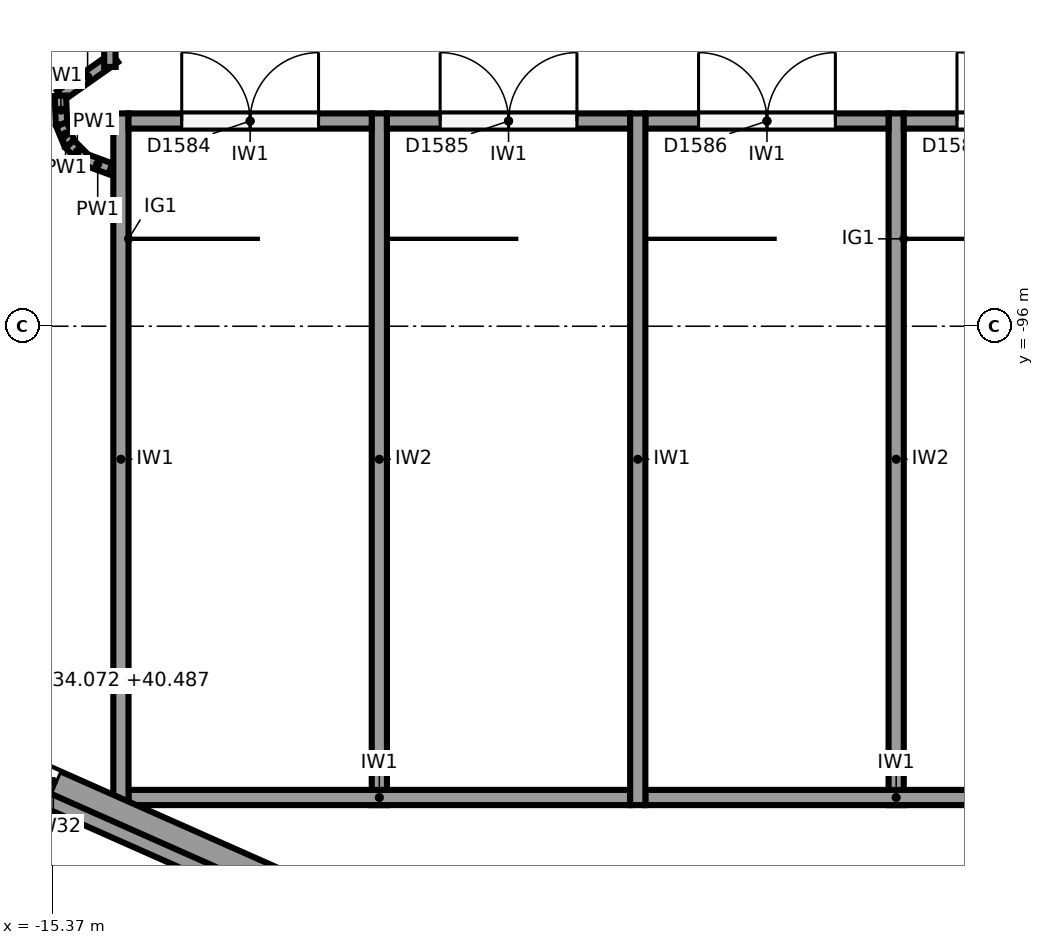
"""IFC4 building model, lengths in metres.
Left out: names, types, materials, properties, quantities, classifications, styles, units other than length and angle.
Written with IfcOpenShell. Run it as: python <this file> out.ifc"""

import sys

from ifc_helpers import new_model, si_unit, direction, frame, frame_2d, origin, place, context, subcontext, project, spatial, polyline, rectangle, outline, extrude, element, fill, save


model = new_model("IFC4")
c1 = context("Model", 3, precision=1e-05, world=origin(), true_north=direction((0.0, 1.0)))
c2 = subcontext(c1, "Body", "Model", "MODEL_VIEW")
j1 = project(units=[si_unit("LENGTHUNIT", "METRE"), si_unit("PLANEANGLEUNIT", "RADIAN")], contexts=[c1])
p1 = place(None, origin())
s1 = spatial("IfcSite", under=j1, at=p1, CompositionType="ELEMENT")
p2 = place(p1, origin())
s2 = spatial("IfcBuilding", under=s1, at=p2, CompositionType="ELEMENT")
p3 = place(p2, frame((0.0, 0.0, 24.0)))
s3 = spatial("IfcBuildingStorey", under=s2, at=p3, CompositionType="ELEMENT", Elevation=24.0)
p4 = place(p3, frame((-8.123, -105.198, 0.0), z_axis=(0.0, 0.0, 1.0), x_axis=(-0.914138897099, 0.405401130748, 0.0)))
e1 = element("IfcWall", 1, at=p4, inside=s3, PredefinedType="SOLIDWALL", context=c2, shape_type="SweptSolid", body=[
    extrude(rectangle(XDim=15.824, YDim=0.32, at=frame_2d((7.912, 0.0))), origin(), (0.0, 0.0, 1.0), 6.0),
])
p5 = place(p4, frame((14.174, 0.0, 1.0)))
e2 = element("IfcOpeningElement", 2, at=p5, cuts=e1, PredefinedType="OPENING", context=c2, shape_type="SweptSolid", body=[
    extrude(rectangle(XDim=0.9, YDim=3.25, at=frame_2d((0.45, 1.625))), frame((0.0, 0.17, 0.0), z_axis=(0.0, -1.0, 0.0), x_axis=(1.0, 0.0, 0.0)), (0.0, 0.0, 1.0), 0.34),
])
p6 = place(p4, frame((12.074, 0.0, 1.0)))
e3 = element("IfcOpeningElement", 3, at=p6, cuts=e1, PredefinedType="OPENING", context=c2, shape_type="SweptSolid", body=[
    extrude(rectangle(XDim=0.9, YDim=3.25, at=frame_2d((0.45, 1.625))), frame((0.0, 0.17, 0.0), z_axis=(0.0, -1.0, 0.0), x_axis=(1.0, 0.0, 0.0)), (0.0, 0.0, 1.0), 0.34),
])
p7 = place(p4, frame((9.974, 0.0, 1.0)))
e4 = element("IfcOpeningElement", 4, at=p7, cuts=e1, PredefinedType="OPENING", context=c2, shape_type="SweptSolid", body=[
    extrude(rectangle(XDim=0.9, YDim=3.25, at=frame_2d((0.45, 1.625))), frame((0.0, 0.17, 0.0), z_axis=(0.0, -1.0, 0.0), x_axis=(1.0, 0.0, 0.0)), (0.0, 0.0, 1.0), 0.34),
])
p8 = place(p4, frame((7.874, 0.0, 1.0)))
e5 = element("IfcOpeningElement", 5, at=p8, cuts=e1, PredefinedType="OPENING", context=c2, shape_type="SweptSolid", body=[
    extrude(rectangle(XDim=0.9, YDim=3.25, at=frame_2d((0.45, 1.625))), frame((0.0, 0.17, 0.0), z_axis=(0.0, -1.0, 0.0), x_axis=(1.0, 0.0, 0.0)), (0.0, 0.0, 1.0), 0.34),
])
p9 = place(p3, frame((-8.204, -105.38, 6.0), z_axis=(0.0, 0.0, 1.0), x_axis=(-0.914138897099, 0.405401130748, 0.0)))
e6 = element("IfcWall", 6, at=p9, inside=s3, PredefinedType="SOLIDWALL", context=c2, shape_type="SweptSolid", body=[
    extrude(outline(polyline([(0.0, 0.0), (15.824, 0.0), (15.824, 4.072), (0.0, 10.488), (0.0, 0.0)])), frame((0.0, 0.16, 0.0), z_axis=(0.0, -1.0, 0.0), x_axis=(1.0, 0.0, 0.0)), (0.0, 0.0, 1.0), 0.32),
])
p10 = place(p9, frame((9.974, 0.0, 1.6)))
e7 = element("IfcOpeningElement", 7, at=p10, cuts=e6, PredefinedType="OPENING", context=c2, shape_type="SweptSolid", body=[
    extrude(rectangle(XDim=0.9, YDim=3.0, at=frame_2d((0.45, 1.5))), frame((0.0, 0.17, 0.0), z_axis=(0.0, -1.0, 0.0), x_axis=(1.0, 0.0, 0.0)), (0.0, 0.0, 1.0), 0.34),
])
p11 = place(p9, frame((7.874, 0.0, 1.6)))
e8 = element("IfcOpeningElement", 8, at=p11, cuts=e6, PredefinedType="OPENING", context=c2, shape_type="SweptSolid", body=[
    extrude(rectangle(XDim=0.9, YDim=3.0, at=frame_2d((0.45, 1.5))), frame((0.0, 0.17, 0.0), z_axis=(0.0, -1.0, 0.0), x_axis=(1.0, 0.0, 0.0)), (0.0, 0.0, 1.0), 0.34),
])
p12 = place(p3, frame((1.852, -101.397, 0.0), z_axis=(0.0, 0.0, 1.0), x_axis=(-0.914133039962, -0.405414337745, 0.0)))
e9 = element("IfcWall", 9, at=p12, inside=s3, PredefinedType="SOLIDWALL", context=c2, shape_type="SweptSolid", body=[
    extrude(rectangle(XDim=9.824, YDim=0.32, at=frame_2d((4.912, 0.0))), origin(), (0.0, 0.0, 1.0), 6.0),
])
p13 = place(p12, frame((1.05, 0.0, 1.0)))
e10 = element("IfcOpeningElement", 10, at=p13, cuts=e9, PredefinedType="OPENING", context=c2, shape_type="SweptSolid", body=[
    extrude(rectangle(XDim=0.9, YDim=3.25, at=frame_2d((0.45, 1.625))), frame((0.0, 0.17, 0.0), z_axis=(0.0, -1.0, 0.0), x_axis=(1.0, 0.0, 0.0)), (0.0, 0.0, 1.0), 0.34),
])
p14 = place(p3, frame((1.852, -101.397, 6.0), z_axis=(0.0, 0.0, 1.0), x_axis=(-0.914133039962, -0.405414337745, 0.0)))
e11 = element("IfcWall", 11, at=p14, inside=s3, PredefinedType="SOLIDWALL", context=c2, shape_type="SweptSolid", body=[
    extrude(outline(polyline([(0.0, 0.0), (9.824, 0.0), (9.824, 10.488), (0.0, 6.505), (0.0, 0.0)])), frame((0.0, 0.16, 0.0), z_axis=(0.0, -1.0, 0.0), x_axis=(1.0, 0.0, 0.0)), (0.0, 0.0, 1.0), 0.32),
])
p15 = place(p14, frame((1.05, 0.0, 1.6)))
e12 = element("IfcOpeningElement", 12, at=p15, cuts=e11, PredefinedType="OPENING", context=c2, shape_type="SweptSolid", body=[
    extrude(rectangle(XDim=0.9, YDim=3.0, at=frame_2d((0.45, 1.5))), frame((0.0, 0.17, 0.0), z_axis=(0.0, -1.0, 0.0), x_axis=(1.0, 0.0, 0.0)), (0.0, 0.0, 1.0), 0.34),
])
for number, where, z_axis, x_axis in (
    (13, (-14.467, -102.3, 0.0), (0.0, 0.0, 1.0), (0.0, 1.0, 0.0)),
    (14, (-7.667, -102.3, 0.0), (0.0, 0.0, 1.0), (0.0, 1.0, 0.0)),
):
    element("IfcWall", number, at=place(p3, frame(where, z_axis=z_axis, x_axis=x_axis)), inside=s3, PredefinedType="SHEAR", context=c2, shape_type="SweptSolid", body=[
        extrude(rectangle(XDim=9.1, YDim=0.2, at=frame_2d((4.55, 0.0))), origin(), (0.0, 0.0, 1.0), 5.75),
    ])
p16 = place(p3, frame((-14.367, -102.2, 0.0), z_axis=(0.0, 0.0, 1.0), x_axis=(1.0, 0.0, 0.0)))
e15 = element("IfcWall", 15, at=p16, inside=s3, PredefinedType="SHEAR", context=c2, shape_type="SweptSolid", body=[
    extrude(rectangle(XDim=6.6, YDim=0.2, at=frame_2d((3.3, 0.0))), origin(), (0.0, 0.0, 1.0), 5.75),
])
p17 = place(p3, frame((-7.567, -102.2, 0.0), z_axis=(0.0, 0.0, 1.0), x_axis=(1.0, 0.0, 0.0)))
e16 = element("IfcWall", 16, at=p17, inside=s3, PredefinedType="SHEAR", context=c2, shape_type="SweptSolid", body=[
    extrude(rectangle(XDim=6.6, YDim=0.2, at=frame_2d((3.3, 0.0))), origin(), (0.0, 0.0, 1.0), 5.75),
])
for number, where, z_axis, x_axis in (
    (17, (-11.067, -102.3, 0.0), (0.0, 0.0, 1.0), (0.0, 1.0, 0.0)),
    (18, (-4.267, -102.3, 0.0), (0.0, 0.0, 1.0), (0.0, 1.0, 0.0)),
):
    element("IfcWall", number, at=place(p3, frame(where, z_axis=z_axis, x_axis=x_axis)), inside=s3, PredefinedType="SHEAR", context=c2, shape_type="SweptSolid", body=[
        extrude(rectangle(XDim=9.1, YDim=0.2, at=frame_2d((4.55, 0.0))), origin(), (0.0, 0.0, 1.0), 5.75),
    ])
p18 = place(p3, frame((-14.367, -93.3, 0.0), z_axis=(0.0, 0.0, 1.0), x_axis=(1.0, 0.0, 0.0)))
e19 = element("IfcWall", 19, at=p18, inside=s3, PredefinedType="SHEAR", context=c2, shape_type="SweptSolid", body=[
    extrude(rectangle(XDim=3.2, YDim=0.2, at=frame_2d((1.6, 0.0))), origin(), (0.0, 0.0, 1.0), 5.75),
])
p19 = place(p18, frame((0.7, 0.0, 0.0)))
e20 = element("IfcOpeningElement", 20, at=p19, cuts=e19, PredefinedType="OPENING", context=c2, shape_type="SweptSolid", body=[
    extrude(rectangle(XDim=1.8, YDim=2.1, at=frame_2d((0.9, 1.05))), frame((0.0, 0.11, 0.0), z_axis=(0.0, -1.0, 0.0), x_axis=(1.0, 0.0, 0.0)), (0.0, 0.0, 1.0), 0.22),
])
p20 = place(p3, frame((-10.967, -93.3, 0.0), z_axis=(0.0, 0.0, 1.0), x_axis=(1.0, 0.0, 0.0)))
e21 = element("IfcWall", 21, at=p20, inside=s3, PredefinedType="SHEAR", context=c2, shape_type="SweptSolid", body=[
    extrude(rectangle(XDim=3.2, YDim=0.2, at=frame_2d((1.6, 0.0))), origin(), (0.0, 0.0, 1.0), 5.75),
])
p21 = place(p20, frame((0.7, 0.0, 0.0)))
e22 = element("IfcOpeningElement", 22, at=p21, cuts=e21, PredefinedType="OPENING", context=c2, shape_type="SweptSolid", body=[
    extrude(rectangle(XDim=1.8, YDim=2.1, at=frame_2d((0.9, 1.05))), frame((0.0, 0.11, 0.0), z_axis=(0.0, -1.0, 0.0), x_axis=(1.0, 0.0, 0.0)), (0.0, 0.0, 1.0), 0.22),
])
p22 = place(p3, frame((-7.567, -93.3, 0.0), z_axis=(0.0, 0.0, 1.0), x_axis=(1.0, 0.0, 0.0)))
e23 = element("IfcWall", 23, at=p22, inside=s3, PredefinedType="SHEAR", context=c2, shape_type="SweptSolid", body=[
    extrude(rectangle(XDim=3.2, YDim=0.2, at=frame_2d((1.6, 0.0))), origin(), (0.0, 0.0, 1.0), 5.75),
])
p23 = place(p22, frame((0.7, 0.0, 0.0)))
e24 = element("IfcOpeningElement", 24, at=p23, cuts=e23, PredefinedType="OPENING", context=c2, shape_type="SweptSolid", body=[
    extrude(rectangle(XDim=1.8, YDim=2.1, at=frame_2d((0.9, 1.05))), frame((0.0, 0.11, 0.0), z_axis=(0.0, -1.0, 0.0), x_axis=(1.0, 0.0, 0.0)), (0.0, 0.0, 1.0), 0.22),
])
p24 = place(p3, frame((-4.167, -93.3, 0.0), z_axis=(0.0, 0.0, 1.0), x_axis=(1.0, 0.0, 0.0)))
e25 = element("IfcWall", 25, at=p24, inside=s3, PredefinedType="SHEAR", context=c2, shape_type="SweptSolid", body=[
    extrude(rectangle(XDim=3.2, YDim=0.2, at=frame_2d((1.6, 0.0))), origin(), (0.0, 0.0, 1.0), 5.75),
])
p25 = place(p24, frame((0.7, 0.0, 0.0)))
e26 = element("IfcOpeningElement", 26, at=p25, cuts=e25, PredefinedType="OPENING", context=c2, shape_type="SweptSolid", body=[
    extrude(rectangle(XDim=1.8, YDim=2.1, at=frame_2d((0.9, 1.05))), frame((0.0, 0.11, 0.0), z_axis=(0.0, -1.0, 0.0), x_axis=(1.0, 0.0, 0.0)), (0.0, 0.0, 1.0), 0.22),
])
p26 = place(p3, frame((-14.547, -92.464, 0.0), z_axis=(0.0, 0.0, 1.0), x_axis=(-0.817670329912, -0.57568674779, 0.0)))
e27 = element("IfcWall", 27, at=p26, inside=s3, PredefinedType="PARTITIONING", context=c2, shape_type="SweptSolid", body=[
    extrude(rectangle(XDim=0.876, YDim=0.15, at=frame_2d((0.438, 0.0))), origin(), (0.0, 0.0, 1.0), 5.4),
])
p27 = place(p3, frame((-15.263, -92.968, 0.0), z_axis=(0.0, 0.0, 1.0), x_axis=(0.039007374993, -0.999238922729, 0.0)))
e28 = element("IfcWall", 28, at=p27, inside=s3, PredefinedType="PARTITIONING", context=c2, shape_type="SweptSolid", body=[
    extrude(rectangle(XDim=0.375, YDim=0.15, at=frame_2d((0.188, 0.0))), origin(), (0.0, 0.0, 1.0), 5.4),
])
p28 = place(p3, frame((-15.249, -93.343, 0.0), z_axis=(0.0, 0.0, 1.0), x_axis=(0.382275228123, -0.924048510611, 0.0)))
e29 = element("IfcWall", 29, at=p28, inside=s3, PredefinedType="PARTITIONING", context=c2, shape_type="SweptSolid", body=[
    extrude(rectangle(XDim=0.282, YDim=0.15, at=frame_2d((0.141, 0.0))), origin(), (0.0, 0.0, 1.0), 5.4),
])
p29 = place(p3, frame((-15.141, -93.604, 0.0), z_axis=(0.0, 0.0, 1.0), x_axis=(0.707106781187, -0.707106781187, 0.0)))
e30 = element("IfcWall", 30, at=p29, inside=s3, PredefinedType="PARTITIONING", context=c2, shape_type="SweptSolid", body=[
    extrude(rectangle(XDim=0.285, YDim=0.15, at=frame_2d((0.143, 0.0))), origin(), (0.0, 0.0, 1.0), 5.4),
])
p30 = place(p3, frame((-14.939, -93.805, 0.0), z_axis=(0.0, 0.0, 1.0), x_axis=(0.937897537761, -0.346912393353, 0.0)))
e31 = element("IfcWall", 31, at=p30, inside=s3, PredefinedType="PARTITIONING", context=c2, shape_type="SweptSolid", body=[
    extrude(rectangle(XDim=0.356, YDim=0.15, at=frame_2d((0.178, 0.0))), origin(), (0.0, 0.0, 1.0), 5.4),
])
p31 = place(p3, frame((-14.642, -87.142, 0.0), z_axis=(0.0, 0.0, 1.0), x_axis=(0.005602780728, -0.999984304301, 0.0)))
e32 = element("IfcWall", 32, at=p31, inside=s3, PredefinedType="PARTITIONING", context=c2, shape_type="SweptSolid", body=[
    extrude(rectangle(XDim=5.447, YDim=0.15, at=frame_2d((2.723, 0.0))), origin(), (0.0, 0.0, 1.0), 5.4),
])
p32 = place(p31, frame((1.55, 0.0, 0.0)))
e33 = element("IfcOpeningElement", 33, at=p32, cuts=e32, PredefinedType="OPENING", context=c2, shape_type="SweptSolid", body=[
    extrude(rectangle(XDim=1.8, YDim=2.1, at=frame_2d((0.9, 1.05))), frame((0.0, 0.085, 0.0), z_axis=(0.0, -1.0, 0.0), x_axis=(1.0, 0.0, 0.0)), (0.0, 0.0, 1.0), 0.17),
])
p33 = place(p8, origin())
e34 = element("IfcWindow", 34, at=p33, inside=s3, PartitioningType="SINGLE_PANEL", PredefinedType="WINDOW", context=c2, shape_type="SweptSolid", body=[
    extrude(rectangle(XDim=0.9, YDim=3.25, at=frame_2d((0.45, 1.625))), frame((0.0, 0.03, 0.0), z_axis=(0.0, -1.0, 0.0), x_axis=(1.0, 0.0, 0.0)), (0.0, 0.0, 1.0), 0.06),
])
fill(e5, e34)
p34 = place(p19, origin())
e35 = element("IfcDoor", 35, at=p34, inside=s3, OperationType="DOUBLE_DOOR_SINGLE_SWING", PredefinedType="DOOR", context=c2, shape_type="SweptSolid", body=[
    extrude(rectangle(XDim=1.8, YDim=2.1, at=frame_2d((0.9, 1.05))), frame((0.0, 0.025, 0.0), z_axis=(0.0, -1.0, 0.0), x_axis=(1.0, 0.0, 0.0)), (0.0, 0.0, 1.0), 0.05),
])
fill(e20, e35)
p35 = place(p21, origin())
e36 = element("IfcDoor", 36, at=p35, inside=s3, OperationType="DOUBLE_DOOR_SINGLE_SWING", PredefinedType="DOOR", context=c2, shape_type="SweptSolid", body=[
    extrude(rectangle(XDim=1.8, YDim=2.1, at=frame_2d((0.9, 1.05))), frame((0.0, 0.025, 0.0), z_axis=(0.0, -1.0, 0.0), x_axis=(1.0, 0.0, 0.0)), (0.0, 0.0, 1.0), 0.05),
])
fill(e22, e36)
p36 = place(p23, origin())
e37 = element("IfcDoor", 37, at=p36, inside=s3, OperationType="DOUBLE_DOOR_SINGLE_SWING", PredefinedType="DOOR", context=c2, shape_type="SweptSolid", body=[
    extrude(rectangle(XDim=1.8, YDim=2.1, at=frame_2d((0.9, 1.05))), frame((0.0, 0.025, 0.0), z_axis=(0.0, -1.0, 0.0), x_axis=(1.0, 0.0, 0.0)), (0.0, 0.0, 1.0), 0.05),
])
fill(e24, e37)
p37 = place(p25, origin())
e38 = element("IfcDoor", 38, at=p37, inside=s3, OperationType="DOUBLE_DOOR_SINGLE_SWING", PredefinedType="DOOR", context=c2, shape_type="SweptSolid", body=[
    extrude(rectangle(XDim=1.8, YDim=2.1, at=frame_2d((0.9, 1.05))), frame((0.0, 0.025, 0.0), z_axis=(0.0, -1.0, 0.0), x_axis=(1.0, 0.0, 0.0)), (0.0, 0.0, 1.0), 0.05),
])
fill(e26, e38)
save(model, sys.argv[1])
